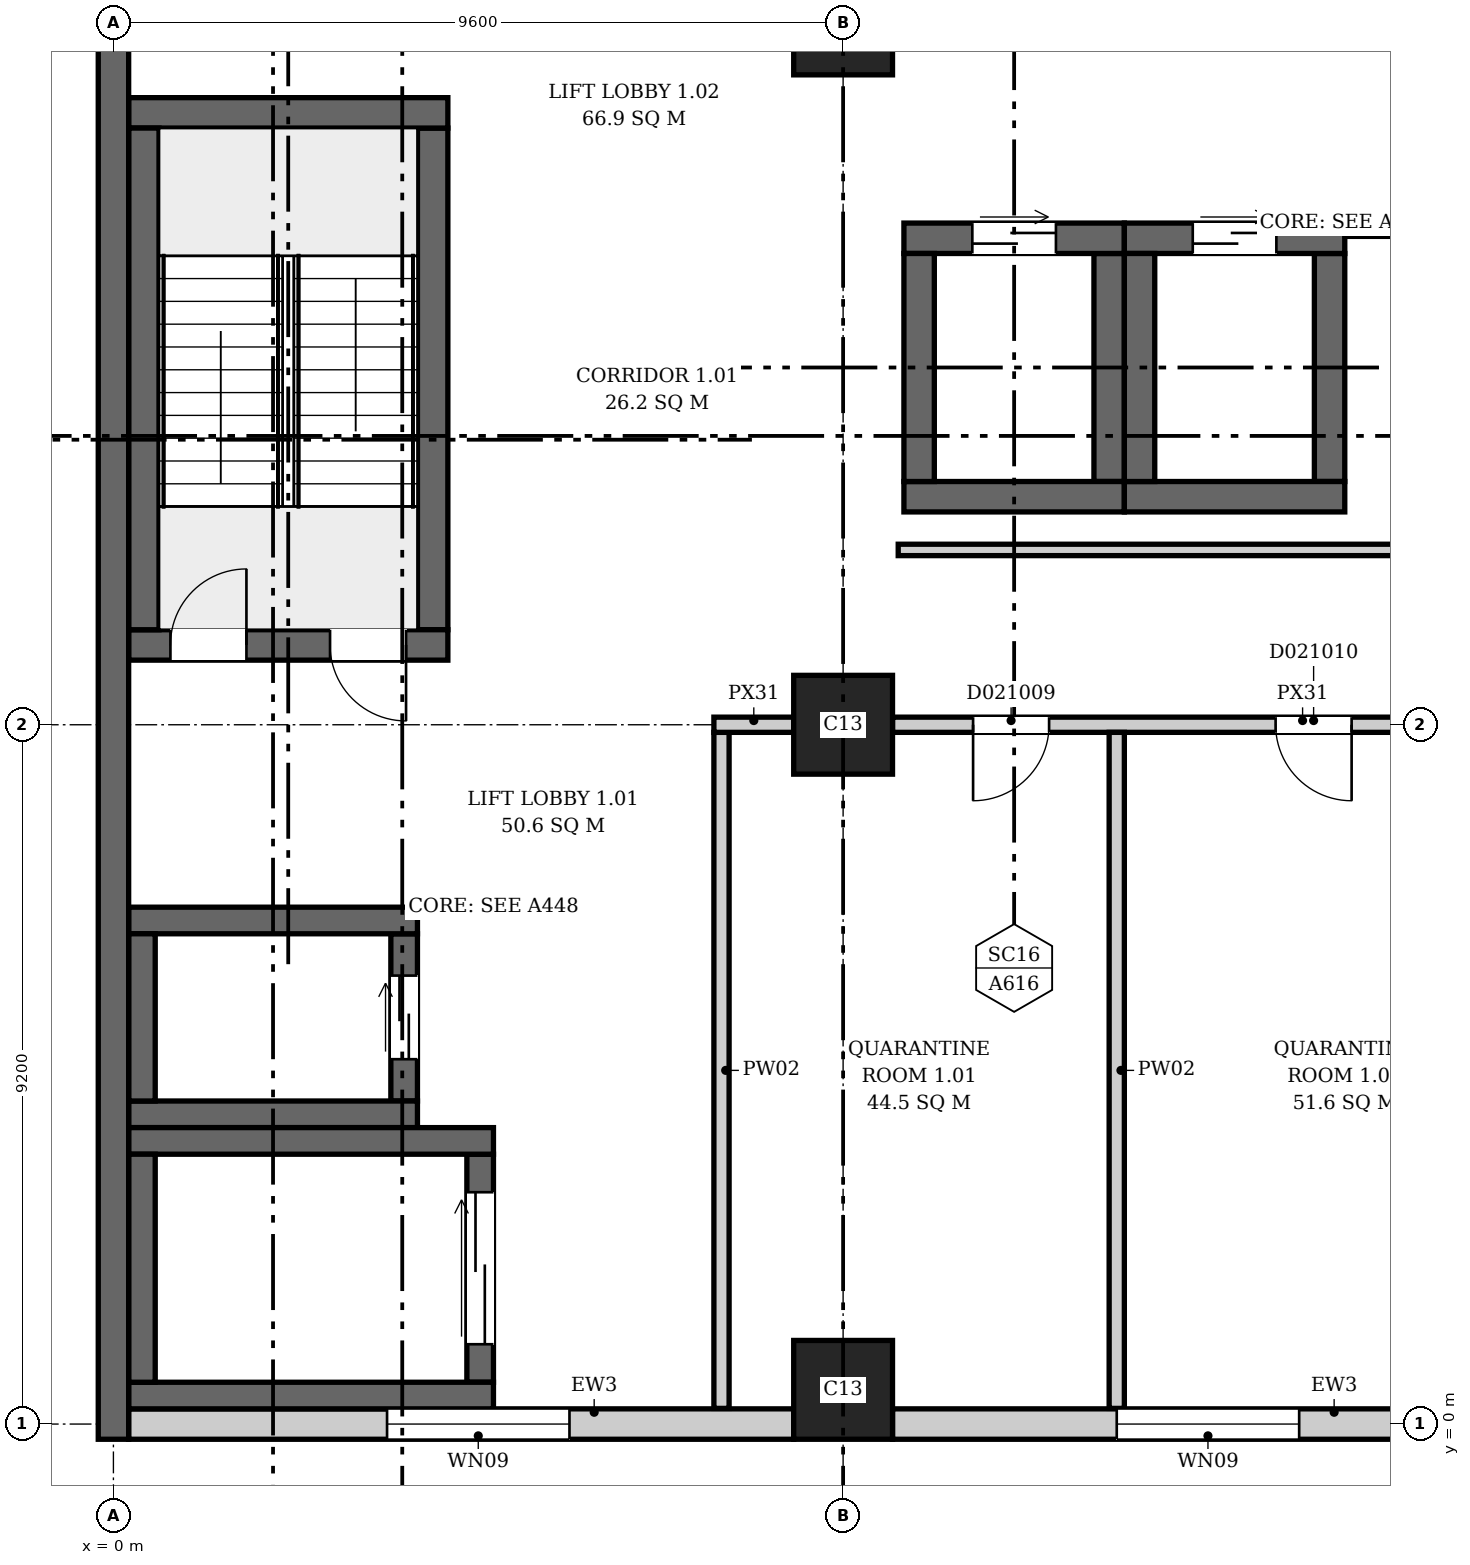
"""IFC4 building model, lengths in metres.
Left out: names, types, materials, properties, quantities, classifications, styles, units other than length and angle.
Written with IfcOpenShell. Run it as: python <this file> out.ifc"""

import sys

from ifc_helpers import new_model, si_unit, direction, frame, frame_2d, origin, origin_2d, place, context, subcontext, project, spatial, rectangle, extrude, element, fill, save


model = new_model("IFC4")
c1 = context("Model", 3, precision=1e-05, world=origin(), true_north=direction((0.0, 1.0)))
c2 = subcontext(c1, "Body", "Model", "MODEL_VIEW")
j1 = project(units=[si_unit("LENGTHUNIT", "METRE"), si_unit("PLANEANGLEUNIT", "RADIAN")], contexts=[c1])
p1 = place(None, origin())
s1 = spatial("IfcSite", under=j1, at=p1, CompositionType="ELEMENT")
p2 = place(p1, origin())
s2 = spatial("IfcBuilding", under=s1, at=p2, CompositionType="ELEMENT")
p3 = place(p2, frame((0.0, 0.0, 6.5)))
s3 = spatial("IfcBuildingStorey", under=s2, at=p3, CompositionType="ELEMENT", Elevation=6.5)
p4 = place(p3, frame((0.0, -0.2, 0.0), z_axis=(0.0, 0.0, 1.0), x_axis=(0.0, 1.0, 0.0)))
e1 = element("IfcWall", 1, at=p4, inside=s3, PredefinedType="SHEAR", context=c2, shape_type="SweptSolid", body=[
    extrude(rectangle(XDim=46.88, YDim=0.4, at=frame_2d((23.44, 0.0))), origin(), (0.0, 0.0, 1.0), 7.7),
])
p5 = place(p3, frame((0.2, 10.25, 0.0), z_axis=(0.0, 0.0, 1.0), x_axis=(1.0, 0.0, 0.0)))
e2 = element("IfcWall", 2, at=p5, inside=s3, PredefinedType="SHEAR", context=c2, shape_type="SweptSolid", body=[
    extrude(rectangle(XDim=4.2, YDim=0.4, at=frame_2d((2.1, 0.0))), origin(), (0.0, 0.0, 1.0), 7.7),
])
p6 = place(p5, frame((0.55, 0.0, 0.0)))
e3 = element("IfcOpeningElement", 3, at=p6, cuts=e2, PredefinedType="OPENING", context=c2, shape_type="SweptSolid", body=[
    extrude(rectangle(XDim=1.0, YDim=2.1, at=frame_2d((0.5, 1.05))), frame((0.0, 0.21, 0.0), z_axis=(0.0, -1.0, 0.0), x_axis=(1.0, 0.0, 0.0)), (0.0, 0.0, 1.0), 0.42),
])
p7 = place(p5, frame((2.65, 0.0, 0.0)))
e4 = element("IfcOpeningElement", 4, at=p7, cuts=e2, PredefinedType="OPENING", context=c2, shape_type="SweptSolid", body=[
    extrude(rectangle(XDim=1.0, YDim=2.1, at=frame_2d((0.5, 1.05))), frame((0.0, 0.21, 0.0), z_axis=(0.0, -1.0, 0.0), x_axis=(1.0, 0.0, 0.0)), (0.0, 0.0, 1.0), 0.42),
])
p8 = place(p3, frame((0.2, 17.25, 0.0), z_axis=(0.0, 0.0, 1.0), x_axis=(1.0, 0.0, 0.0)))
e5 = element("IfcWall", 5, at=p8, inside=s3, PredefinedType="SHEAR", context=c2, shape_type="SweptSolid", body=[
    extrude(rectangle(XDim=4.2, YDim=0.4, at=frame_2d((2.1, 0.0))), origin(), (0.0, 0.0, 1.0), 7.7),
])
for number, where, z_axis, x_axis in (
    (6, (0.4, 10.45, 0.0), (0.0, 0.0, 1.0), (0.0, 1.0, 0.0)),
    (7, (4.2, 10.45, 0.0), (0.0, 0.0, 1.0), (0.0, 1.0, 0.0)),
):
    element("IfcWall", number, at=place(p3, frame(where, z_axis=z_axis, x_axis=x_axis)), inside=s3, PredefinedType="SHEAR", context=c2, shape_type="SweptSolid", body=[
        extrude(rectangle(XDim=6.6, YDim=0.4, at=frame_2d((3.3, 0.0))), origin(), (0.0, 0.0, 1.0), 7.7),
    ])
for number, where, z_axis, x_axis in (
    (8, (0.2, 0.375, 0.0), (0.0, 0.0, 1.0), (1.0, 0.0, 0.0)),
    (9, (0.2, 3.725, 0.0), (0.0, 0.0, 1.0), (1.0, 0.0, 0.0)),
):
    element("IfcWall", number, at=place(p3, frame(where, z_axis=z_axis, x_axis=x_axis)), inside=s3, PredefinedType="SHEAR", context=c2, shape_type="SweptSolid", body=[
        extrude(rectangle(XDim=4.8, YDim=0.35, at=frame_2d((2.4, 0.0))), origin(), (0.0, 0.0, 1.0), 7.7),
    ])
p9 = place(p3, frame((0.375, 0.55, 0.0), z_axis=(0.0, 0.0, 1.0), x_axis=(0.0, 1.0, 0.0)))
e10 = element("IfcWall", 10, at=p9, inside=s3, PredefinedType="SHEAR", context=c2, shape_type="SweptSolid", body=[
    extrude(rectangle(XDim=3.0, YDim=0.35, at=frame_2d((1.5, 0.0))), origin(), (0.0, 0.0, 1.0), 7.7),
])
p10 = place(p3, frame((4.825, 0.55, 0.0), z_axis=(0.0, 0.0, 1.0), x_axis=(0.0, 1.0, 0.0)))
e11 = element("IfcWall", 11, at=p10, inside=s3, PredefinedType="SHEAR", context=c2, shape_type="SweptSolid", body=[
    extrude(rectangle(XDim=3.0, YDim=0.35, at=frame_2d((1.5, 0.0))), origin(), (0.0, 0.0, 1.0), 7.7),
])
p11 = place(p10, frame((0.5, 0.0, 0.0)))
e12 = element("IfcOpeningElement", 12, at=p11, cuts=e11, PredefinedType="OPENING", context=c2, shape_type="SweptSolid", body=[
    extrude(rectangle(XDim=2.0, YDim=2.4, at=frame_2d((1.0, 1.2))), frame((0.0, 0.185, 0.0), z_axis=(0.0, -1.0, 0.0), x_axis=(1.0, 0.0, 0.0)), (0.0, 0.0, 1.0), 0.37),
])
for number, where, z_axis, x_axis in (
    (13, (0.2, 4.075, 0.0), (0.0, 0.0, 1.0), (1.0, 0.0, 0.0)),
    (14, (0.2, 6.625, 0.0), (0.0, 0.0, 1.0), (1.0, 0.0, 0.0)),
):
    element("IfcWall", number, at=place(p3, frame(where, z_axis=z_axis, x_axis=x_axis)), inside=s3, PredefinedType="SHEAR", context=c2, shape_type="SweptSolid", body=[
        extrude(rectangle(XDim=3.8, YDim=0.35, at=frame_2d((1.9, 0.0))), origin(), (0.0, 0.0, 1.0), 7.7),
    ])
p12 = place(p3, frame((0.375, 4.25, 0.0), z_axis=(0.0, 0.0, 1.0), x_axis=(0.0, 1.0, 0.0)))
e15 = element("IfcWall", 15, at=p12, inside=s3, PredefinedType="SHEAR", context=c2, shape_type="SweptSolid", body=[
    extrude(rectangle(XDim=2.2, YDim=0.35, at=frame_2d((1.1, 0.0))), origin(), (0.0, 0.0, 1.0), 7.7),
])
p13 = place(p3, frame((3.825, 4.25, 0.0), z_axis=(0.0, 0.0, 1.0), x_axis=(0.0, 1.0, 0.0)))
e16 = element("IfcWall", 16, at=p13, inside=s3, PredefinedType="SHEAR", context=c2, shape_type="SweptSolid", body=[
    extrude(rectangle(XDim=2.2, YDim=0.35, at=frame_2d((1.1, 0.0))), origin(), (0.0, 0.0, 1.0), 7.7),
])
p14 = place(p13, frame((0.55, 0.0, 0.0)))
e17 = element("IfcOpeningElement", 17, at=p14, cuts=e16, PredefinedType="OPENING", context=c2, shape_type="SweptSolid", body=[
    extrude(rectangle(XDim=1.1, YDim=2.1, at=frame_2d((0.55, 1.05))), frame((0.0, 0.185, 0.0), z_axis=(0.0, -1.0, 0.0), x_axis=(1.0, 0.0, 0.0)), (0.0, 0.0, 1.0), 0.37),
])
p15 = place(p3, frame((10.4, 12.2, 0.0), z_axis=(0.0, 0.0, 1.0), x_axis=(1.0, 0.0, 0.0)))
e18 = element("IfcWall", 18, at=p15, inside=s3, PredefinedType="SHEAR", context=c2, shape_type="SweptSolid", body=[
    extrude(rectangle(XDim=2.9, YDim=0.4, at=frame_2d((1.45, 0.0))), origin(), (0.0, 0.0, 1.0), 7.7),
])
p16 = place(p3, frame((10.4, 15.6, 0.0), z_axis=(0.0, 0.0, 1.0), x_axis=(1.0, 0.0, 0.0)))
e19 = element("IfcWall", 19, at=p16, inside=s3, PredefinedType="SHEAR", context=c2, shape_type="SweptSolid", body=[
    extrude(rectangle(XDim=2.9, YDim=0.4, at=frame_2d((1.45, 0.0))), origin(), (0.0, 0.0, 1.0), 7.7),
])
p17 = place(p16, frame((0.9, 0.0, 0.0)))
e20 = element("IfcOpeningElement", 20, at=p17, cuts=e19, PredefinedType="OPENING", context=c2, shape_type="SweptSolid", body=[
    extrude(rectangle(XDim=1.1, YDim=2.1, at=frame_2d((0.55, 1.05))), frame((0.0, 0.21, 0.0), z_axis=(0.0, -1.0, 0.0), x_axis=(1.0, 0.0, 0.0)), (0.0, 0.0, 1.0), 0.42),
])
for number, where, z_axis, x_axis in (
    (21, (10.6, 12.4, 0.0), (0.0, 0.0, 1.0), (0.0, 1.0, 0.0)),
    (22, (13.1, 12.4, 0.0), (0.0, 0.0, 1.0), (0.0, 1.0, 0.0)),
):
    element("IfcWall", number, at=place(p3, frame(where, z_axis=z_axis, x_axis=x_axis)), inside=s3, PredefinedType="SHEAR", context=c2, shape_type="SweptSolid", body=[
        extrude(rectangle(XDim=3.0, YDim=0.4, at=frame_2d((1.5, 0.0))), origin(), (0.0, 0.0, 1.0), 7.7),
    ])
p18 = place(p3, frame((13.3, 12.2, 0.0), z_axis=(0.0, 0.0, 1.0), x_axis=(1.0, 0.0, 0.0)))
e23 = element("IfcWall", 23, at=p18, inside=s3, PredefinedType="SHEAR", context=c2, shape_type="SweptSolid", body=[
    extrude(rectangle(XDim=2.9, YDim=0.4, at=frame_2d((1.45, 0.0))), origin(), (0.0, 0.0, 1.0), 7.7),
])
p19 = place(p3, frame((13.3, 15.6, 0.0), z_axis=(0.0, 0.0, 1.0), x_axis=(1.0, 0.0, 0.0)))
e24 = element("IfcWall", 24, at=p19, inside=s3, PredefinedType="SHEAR", context=c2, shape_type="SweptSolid", body=[
    extrude(rectangle(XDim=2.9, YDim=0.4, at=frame_2d((1.45, 0.0))), origin(), (0.0, 0.0, 1.0), 7.7),
])
p20 = place(p19, frame((0.9, 0.0, 0.0)))
e25 = element("IfcOpeningElement", 25, at=p20, cuts=e24, PredefinedType="OPENING", context=c2, shape_type="SweptSolid", body=[
    extrude(rectangle(XDim=1.1, YDim=2.1, at=frame_2d((0.55, 1.05))), frame((0.0, 0.21, 0.0), z_axis=(0.0, -1.0, 0.0), x_axis=(1.0, 0.0, 0.0)), (0.0, 0.0, 1.0), 0.42),
])
for number, where, z_axis, x_axis in (
    (26, (13.5, 12.4, 0.0), (0.0, 0.0, 1.0), (0.0, 1.0, 0.0)),
    (27, (16.0, 12.4, 0.0), (0.0, 0.0, 1.0), (0.0, 1.0, 0.0)),
):
    element("IfcWall", number, at=place(p3, frame(where, z_axis=z_axis, x_axis=x_axis)), inside=s3, PredefinedType="SHEAR", context=c2, shape_type="SweptSolid", body=[
        extrude(rectangle(XDim=3.0, YDim=0.4, at=frame_2d((1.5, 0.0))), origin(), (0.0, 0.0, 1.0), 7.7),
    ])
for number, where, z_axis, x_axis in (
    (28, (9.6, 0.45, 0.0), (0.0, 0.0, 1.0), (1.0, 0.0, 0.0)),
    (29, (9.6, 9.2, 0.0), (0.0, 0.0, 1.0), (1.0, 0.0, 0.0)),
    (30, (9.6, 18.4, 0.0), (0.0, 0.0, 1.0), (1.0, 0.0, 0.0)),
):
    element("IfcColumn", number, at=place(p3, frame(where, z_axis=z_axis, x_axis=x_axis)), inside=s3, PredefinedType="COLUMN", context=c2, shape_type="SweptSolid", body=[
        extrude(rectangle(XDim=1.3, YDim=1.3, at=origin_2d()), origin(), (0.0, 0.0, 1.0), 7.7),
    ])
p21 = place(p3, frame((0.2, 0.0, 0.0), z_axis=(0.0, 0.0, 1.0), x_axis=(1.0, 0.0, 0.0)))
e31 = element("IfcWall", 31, at=p21, inside=s3, PredefinedType="ELEMENTEDWALL", context=c2, shape_type="SweptSolid", body=[
    extrude(rectangle(XDim=8.75, YDim=0.4, at=frame_2d((4.375, 0.0))), origin(), (0.0, 0.0, 1.0), 7.35),
])
p22 = place(p21, frame((3.4, 0.0, 1.0)))
e32 = element("IfcOpeningElement", 32, at=p22, cuts=e31, PredefinedType="OPENING", context=c2, shape_type="SweptSolid", body=[
    extrude(rectangle(XDim=2.4, YDim=2.2, at=frame_2d((1.2, 1.1))), frame((0.0, 0.21, 0.0), z_axis=(0.0, -1.0, 0.0), x_axis=(1.0, 0.0, 0.0)), (0.0, 0.0, 1.0), 0.42),
])
p23 = place(p3, frame((10.25, 0.0, 0.0), z_axis=(0.0, 0.0, 1.0), x_axis=(1.0, 0.0, 0.0)))
e33 = element("IfcWall", 33, at=p23, inside=s3, PredefinedType="ELEMENTEDWALL", context=c2, shape_type="SweptSolid", body=[
    extrude(rectangle(XDim=8.3, YDim=0.4, at=frame_2d((4.15, 0.0))), origin(), (0.0, 0.0, 1.0), 7.35),
])
p24 = place(p23, frame((2.95, 0.0, 1.0)))
e34 = element("IfcOpeningElement", 34, at=p24, cuts=e33, PredefinedType="OPENING", context=c2, shape_type="SweptSolid", body=[
    extrude(rectangle(XDim=2.4, YDim=2.2, at=frame_2d((1.2, 1.1))), frame((0.0, 0.21, 0.0), z_axis=(0.0, -1.0, 0.0), x_axis=(1.0, 0.0, 0.0)), (0.0, 0.0, 1.0), 0.42),
])
p25 = place(p3, frame((8.0, 0.206, 0.0), z_axis=(0.0, 0.0, 1.0), x_axis=(0.0, 1.0, 0.0)))
e35 = element("IfcWall", 35, at=p25, inside=s3, PredefinedType="PARTITIONING", context=c2, shape_type="SweptSolid", body=[
    extrude(rectangle(XDim=8.894, YDim=0.2, at=frame_2d((4.447, 0.0))), origin(), (0.0, 0.0, 1.0), 7.35),
])
p26 = place(p3, frame((7.9, 9.2, 0.0), z_axis=(0.0, 0.0, 1.0), x_axis=(1.0, 0.0, 0.0)))
e36 = element("IfcWall", 36, at=p26, inside=s3, PredefinedType="PARTITIONING", context=c2, shape_type="SweptSolid", body=[
    extrude(rectangle(XDim=1.05, YDim=0.2, at=frame_2d((0.525, 0.0))), origin(), (0.0, 0.0, 1.0), 6.95),
])
p27 = place(p3, frame((10.25, 9.2, 0.0), z_axis=(0.0, 0.0, 1.0), x_axis=(1.0, 0.0, 0.0)))
e37 = element("IfcWall", 37, at=p27, inside=s3, PredefinedType="PARTITIONING", context=c2, shape_type="SweptSolid", body=[
    extrude(rectangle(XDim=8.3, YDim=0.2, at=frame_2d((4.15, 0.0))), origin(), (0.0, 0.0, 1.0), 6.95),
])
p28 = place(p27, frame((1.06, 0.0, 0.0)))
e38 = element("IfcOpeningElement", 38, at=p28, cuts=e37, PredefinedType="OPENING", context=c2, shape_type="SweptSolid", body=[
    extrude(rectangle(XDim=1.0, YDim=2.1, at=frame_2d((0.5, 1.05))), frame((0.0, 0.11, 0.0), z_axis=(0.0, -1.0, 0.0), x_axis=(1.0, 0.0, 0.0)), (0.0, 0.0, 1.0), 0.22),
])
p29 = place(p27, frame((5.04, 0.0, 0.0)))
e39 = element("IfcOpeningElement", 39, at=p29, cuts=e37, PredefinedType="OPENING", context=c2, shape_type="SweptSolid", body=[
    extrude(rectangle(XDim=1.0, YDim=2.1, at=frame_2d((0.5, 1.05))), frame((0.0, 0.11, 0.0), z_axis=(0.0, -1.0, 0.0), x_axis=(1.0, 0.0, 0.0)), (0.0, 0.0, 1.0), 0.22),
])
p30 = place(p3, frame((10.325, 11.5, 0.0), z_axis=(0.0, 0.0, 1.0), x_axis=(1.0, 0.0, 0.0)))
e40 = element("IfcWall", 40, at=p30, inside=s3, PredefinedType="PARTITIONING", context=c2, shape_type="SweptSolid", body=[
    extrude(rectangle(XDim=9.569, YDim=0.15, at=frame_2d((4.785, 0.0))), origin(), (0.0, 0.0, 1.0), 7.35),
])
p31 = place(p3, frame((13.2, 0.206, 0.0), z_axis=(0.0, 0.0, 1.0), x_axis=(0.0, 1.0, 0.0)))
e41 = element("IfcWall", 41, at=p31, inside=s3, PredefinedType="PARTITIONING", context=c2, shape_type="SweptSolid", body=[
    extrude(rectangle(XDim=8.894, YDim=0.2, at=frame_2d((4.447, 0.0))), origin(), (0.0, 0.0, 1.0), 7.35),
])
p32 = place(p3, frame((16.206, 15.7, 0.0), z_axis=(0.0, 0.0, 1.0), x_axis=(1.0, 0.0, 0.0)))
e42 = element("IfcWall", 42, at=p32, inside=s3, PredefinedType="PARTITIONING", context=c2, shape_type="SweptSolid", body=[
    extrude(rectangle(XDim=3.688, YDim=0.15, at=frame_2d((1.844, 0.0))), origin(), (0.0, 0.0, 1.0), 7.35),
])
p33 = place(p22, origin())
e43 = element("IfcWindow", 43, at=p33, inside=s3, PartitioningType="SINGLE_PANEL", PredefinedType="WINDOW", context=c2, shape_type="SweptSolid", body=[
    extrude(rectangle(XDim=2.4, YDim=2.2, at=frame_2d((1.2, 1.1))), frame((0.0, 0.03, 0.0), z_axis=(0.0, -1.0, 0.0), x_axis=(1.0, 0.0, 0.0)), (0.0, 0.0, 1.0), 0.06),
])
fill(e32, e43)
p34 = place(p24, origin())
e44 = element("IfcWindow", 44, at=p34, inside=s3, PartitioningType="SINGLE_PANEL", PredefinedType="WINDOW", context=c2, shape_type="SweptSolid", body=[
    extrude(rectangle(XDim=2.4, YDim=2.2, at=frame_2d((1.2, 1.1))), frame((0.0, 0.03, 0.0), z_axis=(0.0, -1.0, 0.0), x_axis=(1.0, 0.0, 0.0)), (0.0, 0.0, 1.0), 0.06),
])
fill(e34, e44)
p35 = place(p6, origin())
e45 = element("IfcDoor", 45, at=p35, inside=s3, OperationType="SINGLE_SWING_RIGHT", PredefinedType="DOOR", context=c2, shape_type="SweptSolid", body=[
    extrude(rectangle(XDim=1.0, YDim=2.1, at=frame_2d((0.5, 1.05))), frame((0.0, 0.025, 0.0), z_axis=(0.0, -1.0, 0.0), x_axis=(1.0, 0.0, 0.0)), (0.0, 0.0, 1.0), 0.05),
])
fill(e3, e45)
p36 = place(p7, origin())
e46 = element("IfcDoor", 46, at=p36, inside=s3, OperationType="SINGLE_SWING_LEFT", PredefinedType="DOOR", context=c2, shape_type="SweptSolid", body=[
    extrude(rectangle(XDim=1.0, YDim=2.1, at=frame_2d((0.5, 1.05))), frame((0.0, 0.025, 0.0), z_axis=(0.0, -1.0, 0.0), x_axis=(1.0, 0.0, 0.0)), (0.0, 0.0, 1.0), 0.05),
])
fill(e4, e46)
p37 = place(p11, origin())
e47 = element("IfcDoor", 47, at=p37, inside=s3, OperationType="DOUBLE_DOOR_SLIDING", PredefinedType="DOOR", context=c2, shape_type="SweptSolid", body=[
    extrude(rectangle(XDim=2.0, YDim=2.4, at=frame_2d((1.0, 1.2))), frame((0.0, 0.025, 0.0), z_axis=(0.0, -1.0, 0.0), x_axis=(1.0, 0.0, 0.0)), (0.0, 0.0, 1.0), 0.05),
])
fill(e12, e47)
p38 = place(p14, origin())
e48 = element("IfcDoor", 48, at=p38, inside=s3, OperationType="DOUBLE_DOOR_SLIDING", PredefinedType="DOOR", context=c2, shape_type="SweptSolid", body=[
    extrude(rectangle(XDim=1.1, YDim=2.1, at=frame_2d((0.55, 1.05))), frame((0.0, 0.025, 0.0), z_axis=(0.0, -1.0, 0.0), x_axis=(1.0, 0.0, 0.0)), (0.0, 0.0, 1.0), 0.05),
])
fill(e17, e48)
p39 = place(p17, origin())
e49 = element("IfcDoor", 49, at=p39, inside=s3, OperationType="DOUBLE_DOOR_SLIDING", PredefinedType="DOOR", context=c2, shape_type="SweptSolid", body=[
    extrude(rectangle(XDim=1.1, YDim=2.1, at=frame_2d((0.55, 1.05))), frame((0.0, 0.025, 0.0), z_axis=(0.0, -1.0, 0.0), x_axis=(1.0, 0.0, 0.0)), (0.0, 0.0, 1.0), 0.05),
])
fill(e20, e49)
p40 = place(p20, origin())
e50 = element("IfcDoor", 50, at=p40, inside=s3, OperationType="DOUBLE_DOOR_SLIDING", PredefinedType="DOOR", context=c2, shape_type="SweptSolid", body=[
    extrude(rectangle(XDim=1.1, YDim=2.1, at=frame_2d((0.55, 1.05))), frame((0.0, 0.025, 0.0), z_axis=(0.0, -1.0, 0.0), x_axis=(1.0, 0.0, 0.0)), (0.0, 0.0, 1.0), 0.05),
])
fill(e25, e50)
p41 = place(p28, origin())
e51 = element("IfcDoor", 51, at=p41, inside=s3, OperationType="SINGLE_SWING_LEFT", PredefinedType="DOOR", context=c2, shape_type="SweptSolid", body=[
    extrude(rectangle(XDim=1.0, YDim=2.1, at=frame_2d((0.5, 1.05))), frame((0.0, 0.025, 0.0), z_axis=(0.0, -1.0, 0.0), x_axis=(1.0, 0.0, 0.0)), (0.0, 0.0, 1.0), 0.05),
])
fill(e38, e51)
p42 = place(p29, origin())
e52 = element("IfcDoor", 52, at=p42, inside=s3, OperationType="SINGLE_SWING_RIGHT", PredefinedType="DOOR", context=c2, shape_type="SweptSolid", body=[
    extrude(rectangle(XDim=1.0, YDim=2.1, at=frame_2d((0.5, 1.05))), frame((0.0, 0.025, 0.0), z_axis=(0.0, -1.0, 0.0), x_axis=(1.0, 0.0, 0.0)), (0.0, 0.0, 1.0), 0.05),
])
fill(e39, e52)
save(model, sys.argv[1])
